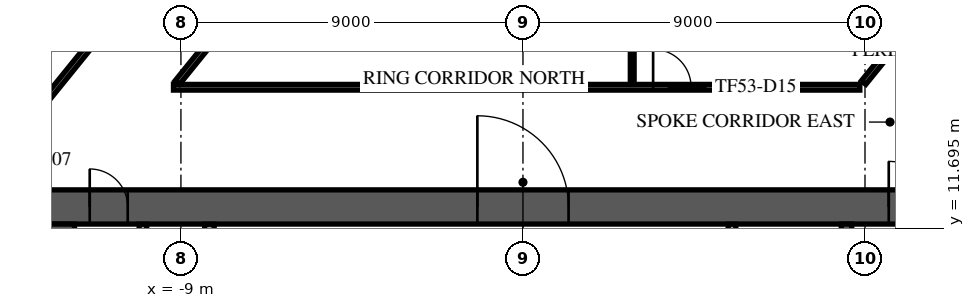
"""IFC4 building model, lengths in metres.
Left out: names, types, materials, properties, quantities, classifications, styles, units other than length and angle.
Written with IfcOpenShell. Run it as: python <this file> out.ifc"""

import sys

from ifc_helpers import new_model, si_unit, direction, frame, frame_2d, origin, place, context, subcontext, project, spatial, rectangle, extrude, element, fill, save


model = new_model("IFC4")
c1 = context("Model", 3, precision=1e-05, world=origin(), true_north=direction((0.0, 1.0)))
c2 = subcontext(c1, "Body", "Model", "MODEL_VIEW")
j1 = project(units=[si_unit("LENGTHUNIT", "METRE"), si_unit("PLANEANGLEUNIT", "RADIAN")], contexts=[c1])
p1 = place(None, origin())
s1 = spatial("IfcSite", under=j1, at=p1, CompositionType="ELEMENT")
p2 = place(p1, origin())
s2 = spatial("IfcBuilding", under=s1, at=p2, CompositionType="ELEMENT")
p3 = place(p2, frame((0.0, 0.0, 225.3)))
s3 = spatial("IfcBuildingStorey", under=s2, at=p3, CompositionType="ELEMENT", Elevation=225.3)
p4 = place(p3, frame((-12.7, 12.25, 0.0), z_axis=(0.0, 0.0, 1.0), x_axis=(1.0, 0.0, 0.0)))
e1 = element("IfcWall", 1, at=p4, inside=s3, PredefinedType="SHEAR", context=c2, shape_type="SweptSolid", body=[
    extrude(rectangle(XDim=25.4, YDim=0.9, at=frame_2d((12.7, 0.0))), origin(), (0.0, 0.0, 1.0), 3.62),
])
p5 = place(p4, frame((11.5, 0.0, 0.0)))
e2 = element("IfcOpeningElement", 2, at=p5, cuts=e1, PredefinedType="OPENING", context=c2, shape_type="SweptSolid", body=[
    extrude(rectangle(XDim=2.4, YDim=2.4, at=frame_2d((1.2, 1.2))), frame((0.0, 0.46, 0.0), z_axis=(0.0, -1.0, 0.0), x_axis=(1.0, 0.0, 0.0)), (0.0, 0.0, 1.0), 0.92),
])
p6 = place(p4, frame((22.325, 0.0, 0.0)))
e3 = element("IfcOpeningElement", 3, at=p6, cuts=e1, PredefinedType="OPENING", context=c2, shape_type="SweptSolid", body=[
    extrude(rectangle(XDim=1.2, YDim=2.1, at=frame_2d((0.6, 1.05))), frame((0.0, 0.46, 0.0), z_axis=(0.0, -1.0, 0.0), x_axis=(1.0, 0.0, 0.0)), (0.0, 0.0, 1.0), 0.92),
])
p7 = place(p4, frame((1.3, 0.0, 0.0)))
e4 = element("IfcOpeningElement", 4, at=p7, cuts=e1, PredefinedType="OPENING", context=c2, shape_type="SweptSolid", body=[
    extrude(rectangle(XDim=1.0, YDim=2.1, at=frame_2d((0.5, 1.05))), frame((0.0, 0.46, 0.0), z_axis=(0.0, -1.0, 0.0), x_axis=(1.0, 0.0, 0.0)), (0.0, 0.0, 1.0), 0.92),
])
p8 = place(p3, frame((-12.25, -11.8, 0.0), z_axis=(0.0, 0.0, 1.0), x_axis=(0.0, 1.0, 0.0)))
e5 = element("IfcWall", 5, at=p8, inside=s3, PredefinedType="SHEAR", context=c2, shape_type="SweptSolid", body=[
    extrude(rectangle(XDim=23.6, YDim=0.9, at=frame_2d((11.8, 0.0))), origin(), (0.0, 0.0, 1.0), 3.62),
])
p9 = place(p8, frame((10.6, 0.0, 0.0)))
e6 = element("IfcOpeningElement", 6, at=p9, cuts=e5, PredefinedType="OPENING", context=c2, shape_type="SweptSolid", body=[
    extrude(rectangle(XDim=2.4, YDim=2.4, at=frame_2d((1.2, 1.2))), frame((0.0, 0.46, 0.0), z_axis=(0.0, -1.0, 0.0), x_axis=(1.0, 0.0, 0.0)), (0.0, 0.0, 1.0), 0.92),
])
p10 = place(p3, frame((8.512, 4.55, 0.0), z_axis=(0.0, 0.0, 1.0), x_axis=(0.0, 1.0, 0.0)))
e7 = element("IfcWall", 7, at=p10, inside=s3, PredefinedType="SOLIDWALL", context=c2, shape_type="SweptSolid", body=[
    extrude(rectangle(XDim=7.25, YDim=0.275, at=frame_2d((3.625, 0.0))), origin(), (0.0, 0.0, 1.0), 3.62),
])
p11 = place(p10, frame((6.0, 0.0, 0.0)))
e8 = element("IfcOpeningElement", 8, at=p11, cuts=e7, PredefinedType="OPENING", context=c2, shape_type="SweptSolid", body=[
    extrude(rectangle(XDim=1.0, YDim=2.1, at=frame_2d((0.5, 1.05))), frame((0.0, 0.147, 0.0), z_axis=(0.0, -1.0, 0.0), x_axis=(1.0, 0.0, 0.0)), (0.0, 0.0, 1.0), 0.295),
])
p12 = place(p3, frame((-10.0, 4.78, 0.0), z_axis=(0.0, 0.0, 1.0), x_axis=(0.0, 1.0, 0.0)))
e9 = element("IfcWall", 9, at=p12, inside=s3, PredefinedType="PARTITIONING", context=c2, shape_type="SweptSolid", body=[
    extrude(rectangle(XDim=7.015, YDim=0.2, at=frame_2d((3.507, 0.0))), origin(), (0.0, 0.0, 1.0), 3.62),
])
p13 = place(p12, frame((2.92, 0.0, 0.0)))
e10 = element("IfcOpeningElement", 10, at=p13, cuts=e9, PredefinedType="OPENING", context=c2, shape_type="SweptSolid", body=[
    extrude(rectangle(XDim=1.0, YDim=2.1, at=frame_2d((0.5, 1.05))), frame((0.0, 0.11, 0.0), z_axis=(0.0, -1.0, 0.0), x_axis=(1.0, 0.0, 0.0)), (0.0, 0.0, 1.0), 0.22),
])
p14 = place(p3, frame((-8.25, 8.805, 0.0), z_axis=(0.0, 0.0, 1.0), x_axis=(0.0, 1.0, 0.0)))
e11 = element("IfcWall", 11, at=p14, inside=s3, PredefinedType="PARTITIONING", context=c2, shape_type="SweptSolid", body=[
    extrude(rectangle(XDim=2.99, YDim=0.25, at=frame_2d((1.495, 0.0))), origin(), (0.0, 0.0, 1.0), 3.62),
])
p15 = place(p14, frame((0.895, 0.0, 0.0)))
e12 = element("IfcOpeningElement", 12, at=p15, cuts=e11, PredefinedType="OPENING", context=c2, shape_type="SweptSolid", body=[
    extrude(rectangle(XDim=1.0, YDim=2.1, at=frame_2d((0.5, 1.05))), frame((0.0, 0.135, 0.0), z_axis=(0.0, -1.0, 0.0), x_axis=(1.0, 0.0, 0.0)), (0.0, 0.0, 1.0), 0.27),
])
p16 = place(p3, frame((5.5, 8.805, 0.0), z_axis=(0.0, 0.0, 1.0), x_axis=(0.0, 1.0, 0.0)))
e13 = element("IfcWall", 13, at=p16, inside=s3, PredefinedType="PARTITIONING", context=c2, shape_type="SweptSolid", body=[
    extrude(rectangle(XDim=2.99, YDim=0.2, at=frame_2d((1.495, 0.0))), origin(), (0.0, 0.0, 1.0), 3.62),
])
p17 = place(p16, frame((0.532, 0.0, 0.0)))
e14 = element("IfcOpeningElement", 14, at=p17, cuts=e13, PredefinedType="OPENING", context=c2, shape_type="SweptSolid", body=[
    extrude(rectangle(XDim=1.8, YDim=2.1, at=frame_2d((0.9, 1.05))), frame((0.0, 0.11, 0.0), z_axis=(0.0, -1.0, 0.0), x_axis=(1.0, 0.0, 0.0)), (0.0, 0.0, 1.0), 0.22),
])
p18 = place(p3, frame((-3.777, 34.584, 0.0), z_axis=(0.0, 0.0, 1.0), x_axis=(-0.629323778295, -0.777143218508, 0.0)))
e15 = element("IfcWall", 15, at=p18, inside=s3, PredefinedType="STANDARD", context=c2, shape_type="SweptSolid", body=[
    extrude(rectangle(XDim=49.0, YDim=0.6, at=frame_2d((24.5, 0.0))), origin(), (0.0, 0.0, 1.0), 3.62),
])
p19 = place(p18, frame((1.227, 0.0, 0.9)))
e16 = element("IfcOpeningElement", 16, at=p19, cuts=e15, PredefinedType="OPENING", context=c2, shape_type="SweptSolid", body=[
    extrude(rectangle(XDim=2.0, YDim=2.1, at=frame_2d((1.0, 1.05))), frame((0.0, 0.31, 0.0), z_axis=(0.0, -1.0, 0.0), x_axis=(1.0, 0.0, 0.0)), (0.0, 0.0, 1.0), 0.62),
])
p20 = place(p18, frame((5.682, 0.0, 0.9)))
e17 = element("IfcOpeningElement", 17, at=p20, cuts=e15, PredefinedType="OPENING", context=c2, shape_type="SweptSolid", body=[
    extrude(rectangle(XDim=2.0, YDim=2.1, at=frame_2d((1.0, 1.05))), frame((0.0, 0.31, 0.0), z_axis=(0.0, -1.0, 0.0), x_axis=(1.0, 0.0, 0.0)), (0.0, 0.0, 1.0), 0.62),
])
p21 = place(p18, frame((10.136, 0.0, 0.9)))
e18 = element("IfcOpeningElement", 18, at=p21, cuts=e15, PredefinedType="OPENING", context=c2, shape_type="SweptSolid", body=[
    extrude(rectangle(XDim=2.0, YDim=2.1, at=frame_2d((1.0, 1.05))), frame((0.0, 0.31, 0.0), z_axis=(0.0, -1.0, 0.0), x_axis=(1.0, 0.0, 0.0)), (0.0, 0.0, 1.0), 0.62),
])
p22 = place(p18, frame((14.591, 0.0, 0.9)))
e19 = element("IfcOpeningElement", 19, at=p22, cuts=e15, PredefinedType="OPENING", context=c2, shape_type="SweptSolid", body=[
    extrude(rectangle(XDim=2.0, YDim=2.1, at=frame_2d((1.0, 1.05))), frame((0.0, 0.31, 0.0), z_axis=(0.0, -1.0, 0.0), x_axis=(1.0, 0.0, 0.0)), (0.0, 0.0, 1.0), 0.62),
])
p23 = place(p18, frame((19.045, 0.0, 0.9)))
e20 = element("IfcOpeningElement", 20, at=p23, cuts=e15, PredefinedType="OPENING", context=c2, shape_type="SweptSolid", body=[
    extrude(rectangle(XDim=2.0, YDim=2.1, at=frame_2d((1.0, 1.05))), frame((0.0, 0.31, 0.0), z_axis=(0.0, -1.0, 0.0), x_axis=(1.0, 0.0, 0.0)), (0.0, 0.0, 1.0), 0.62),
])
p24 = place(p18, frame((23.5, 0.0, 0.9)))
e21 = element("IfcOpeningElement", 21, at=p24, cuts=e15, PredefinedType="OPENING", context=c2, shape_type="SweptSolid", body=[
    extrude(rectangle(XDim=2.0, YDim=2.1, at=frame_2d((1.0, 1.05))), frame((0.0, 0.31, 0.0), z_axis=(0.0, -1.0, 0.0), x_axis=(1.0, 0.0, 0.0)), (0.0, 0.0, 1.0), 0.62),
])
p25 = place(p18, frame((27.955, 0.0, 0.9)))
e22 = element("IfcOpeningElement", 22, at=p25, cuts=e15, PredefinedType="OPENING", context=c2, shape_type="SweptSolid", body=[
    extrude(rectangle(XDim=2.0, YDim=2.1, at=frame_2d((1.0, 1.05))), frame((0.0, 0.31, 0.0), z_axis=(0.0, -1.0, 0.0), x_axis=(1.0, 0.0, 0.0)), (0.0, 0.0, 1.0), 0.62),
])
p26 = place(p18, frame((32.409, 0.0, 0.9)))
e23 = element("IfcOpeningElement", 23, at=p26, cuts=e15, PredefinedType="OPENING", context=c2, shape_type="SweptSolid", body=[
    extrude(rectangle(XDim=2.0, YDim=2.1, at=frame_2d((1.0, 1.05))), frame((0.0, 0.31, 0.0), z_axis=(0.0, -1.0, 0.0), x_axis=(1.0, 0.0, 0.0)), (0.0, 0.0, 1.0), 0.62),
])
p27 = place(p18, frame((36.864, 0.0, 0.9)))
e24 = element("IfcOpeningElement", 24, at=p27, cuts=e15, PredefinedType="OPENING", context=c2, shape_type="SweptSolid", body=[
    extrude(rectangle(XDim=2.0, YDim=2.1, at=frame_2d((1.0, 1.05))), frame((0.0, 0.31, 0.0), z_axis=(0.0, -1.0, 0.0), x_axis=(1.0, 0.0, 0.0)), (0.0, 0.0, 1.0), 0.62),
])
p28 = place(p18, frame((41.318, 0.0, 0.9)))
e25 = element("IfcOpeningElement", 25, at=p28, cuts=e15, PredefinedType="OPENING", context=c2, shape_type="SweptSolid", body=[
    extrude(rectangle(XDim=2.0, YDim=2.1, at=frame_2d((1.0, 1.05))), frame((0.0, 0.31, 0.0), z_axis=(0.0, -1.0, 0.0), x_axis=(1.0, 0.0, 0.0)), (0.0, 0.0, 1.0), 0.62),
])
p29 = place(p18, frame((45.773, 0.0, 0.9)))
e26 = element("IfcOpeningElement", 26, at=p29, cuts=e15, PredefinedType="OPENING", context=c2, shape_type="SweptSolid", body=[
    extrude(rectangle(XDim=2.0, YDim=2.1, at=frame_2d((1.0, 1.05))), frame((0.0, 0.31, 0.0), z_axis=(0.0, -1.0, 0.0), x_axis=(1.0, 0.0, 0.0)), (0.0, 0.0, 1.0), 0.62),
])
p30 = place(p3, frame((33.845, 10.81, 0.0), z_axis=(0.0, 0.0, 1.0), x_axis=(-0.777145437972, 0.629321037499, 0.0)))
e27 = element("IfcWall", 27, at=p30, inside=s3, PredefinedType="STANDARD", context=c2, shape_type="SweptSolid", body=[
    extrude(rectangle(XDim=39.0, YDim=0.6, at=frame_2d((19.5, 0.0))), origin(), (0.0, 0.0, 1.0), 3.62),
])
p31 = place(p30, frame((1.217, 0.0, 0.9)))
e28 = element("IfcOpeningElement", 28, at=p31, cuts=e27, PredefinedType="OPENING", context=c2, shape_type="SweptSolid", body=[
    extrude(rectangle(XDim=1.9, YDim=2.1, at=frame_2d((0.95, 1.05))), frame((0.0, 0.31, 0.0), z_axis=(0.0, -1.0, 0.0), x_axis=(1.0, 0.0, 0.0)), (0.0, 0.0, 1.0), 0.62),
])
p32 = place(p30, frame((5.55, 0.0, 0.9)))
e29 = element("IfcOpeningElement", 29, at=p32, cuts=e27, PredefinedType="OPENING", context=c2, shape_type="SweptSolid", body=[
    extrude(rectangle(XDim=1.9, YDim=2.1, at=frame_2d((0.95, 1.05))), frame((0.0, 0.31, 0.0), z_axis=(0.0, -1.0, 0.0), x_axis=(1.0, 0.0, 0.0)), (0.0, 0.0, 1.0), 0.62),
])
p33 = place(p30, frame((9.883, 0.0, 0.9)))
e30 = element("IfcOpeningElement", 30, at=p33, cuts=e27, PredefinedType="OPENING", context=c2, shape_type="SweptSolid", body=[
    extrude(rectangle(XDim=1.9, YDim=2.1, at=frame_2d((0.95, 1.05))), frame((0.0, 0.31, 0.0), z_axis=(0.0, -1.0, 0.0), x_axis=(1.0, 0.0, 0.0)), (0.0, 0.0, 1.0), 0.62),
])
p34 = place(p30, frame((14.217, 0.0, 0.9)))
e31 = element("IfcOpeningElement", 31, at=p34, cuts=e27, PredefinedType="OPENING", context=c2, shape_type="SweptSolid", body=[
    extrude(rectangle(XDim=1.9, YDim=2.1, at=frame_2d((0.95, 1.05))), frame((0.0, 0.31, 0.0), z_axis=(0.0, -1.0, 0.0), x_axis=(1.0, 0.0, 0.0)), (0.0, 0.0, 1.0), 0.62),
])
p35 = place(p30, frame((18.55, 0.0, 0.9)))
e32 = element("IfcOpeningElement", 32, at=p35, cuts=e27, PredefinedType="OPENING", context=c2, shape_type="SweptSolid", body=[
    extrude(rectangle(XDim=1.9, YDim=2.1, at=frame_2d((0.95, 1.05))), frame((0.0, 0.31, 0.0), z_axis=(0.0, -1.0, 0.0), x_axis=(1.0, 0.0, 0.0)), (0.0, 0.0, 1.0), 0.62),
])
p36 = place(p30, frame((22.883, 0.0, 0.9)))
e33 = element("IfcOpeningElement", 33, at=p36, cuts=e27, PredefinedType="OPENING", context=c2, shape_type="SweptSolid", body=[
    extrude(rectangle(XDim=1.9, YDim=2.1, at=frame_2d((0.95, 1.05))), frame((0.0, 0.31, 0.0), z_axis=(0.0, -1.0, 0.0), x_axis=(1.0, 0.0, 0.0)), (0.0, 0.0, 1.0), 0.62),
])
p37 = place(p30, frame((27.217, 0.0, 0.9)))
e34 = element("IfcOpeningElement", 34, at=p37, cuts=e27, PredefinedType="OPENING", context=c2, shape_type="SweptSolid", body=[
    extrude(rectangle(XDim=1.9, YDim=2.1, at=frame_2d((0.95, 1.05))), frame((0.0, 0.31, 0.0), z_axis=(0.0, -1.0, 0.0), x_axis=(1.0, 0.0, 0.0)), (0.0, 0.0, 1.0), 0.62),
])
p38 = place(p30, frame((31.55, 0.0, 0.9)))
e35 = element("IfcOpeningElement", 35, at=p38, cuts=e27, PredefinedType="OPENING", context=c2, shape_type="SweptSolid", body=[
    extrude(rectangle(XDim=1.9, YDim=2.1, at=frame_2d((0.95, 1.05))), frame((0.0, 0.31, 0.0), z_axis=(0.0, -1.0, 0.0), x_axis=(1.0, 0.0, 0.0)), (0.0, 0.0, 1.0), 0.62),
])
p39 = place(p30, frame((35.883, 0.0, 0.9)))
e36 = element("IfcOpeningElement", 36, at=p39, cuts=e27, PredefinedType="OPENING", context=c2, shape_type="SweptSolid", body=[
    extrude(rectangle(XDim=1.9, YDim=2.1, at=frame_2d((0.95, 1.05))), frame((0.0, 0.31, 0.0), z_axis=(0.0, -1.0, 0.0), x_axis=(1.0, 0.0, 0.0)), (0.0, 0.0, 1.0), 0.62),
])
p40 = place(p3, frame((-26.769, -2.487, 0.0), z_axis=(0.0, 0.0, 1.0), x_axis=(0.629320703929, 0.777145708092, 0.0)))
e37 = element("IfcWall", 37, at=p40, inside=s3, PredefinedType="PARTITIONING", context=c2, shape_type="SweptSolid", body=[
    extrude(rectangle(XDim=37.558, YDim=0.15, at=frame_2d((18.779, 0.0))), origin(), (0.0, 0.0, 1.0), 2.97),
])
p41 = place(p40, frame((3.55, 0.0, 0.0)))
e38 = element("IfcOpeningElement", 38, at=p41, cuts=e37, PredefinedType="OPENING", context=c2, shape_type="SweptSolid", body=[
    extrude(rectangle(XDim=1.0, YDim=2.1, at=frame_2d((0.5, 1.05))), frame((0.0, 0.085, 0.0), z_axis=(0.0, -1.0, 0.0), x_axis=(1.0, 0.0, 0.0)), (0.0, 0.0, 1.0), 0.17),
])
p42 = place(p40, frame((11.862, 0.0, 0.0)))
e39 = element("IfcOpeningElement", 39, at=p42, cuts=e37, PredefinedType="OPENING", context=c2, shape_type="SweptSolid", body=[
    extrude(rectangle(XDim=1.0, YDim=2.1, at=frame_2d((0.5, 1.05))), frame((0.0, 0.085, 0.0), z_axis=(0.0, -1.0, 0.0), x_axis=(1.0, 0.0, 0.0)), (0.0, 0.0, 1.0), 0.17),
])
p43 = place(p40, frame((21.452, 0.0, 0.0)))
e40 = element("IfcOpeningElement", 40, at=p43, cuts=e37, PredefinedType="OPENING", context=c2, shape_type="SweptSolid", body=[
    extrude(rectangle(XDim=1.0, YDim=2.1, at=frame_2d((0.5, 1.05))), frame((0.0, 0.085, 0.0), z_axis=(0.0, -1.0, 0.0), x_axis=(1.0, 0.0, 0.0)), (0.0, 0.0, 1.0), 0.17),
])
p44 = place(p40, frame((31.223, 0.0, 0.0)))
e41 = element("IfcOpeningElement", 41, at=p44, cuts=e37, PredefinedType="OPENING", context=c2, shape_type="SweptSolid", body=[
    extrude(rectangle(XDim=1.0, YDim=2.1, at=frame_2d((0.5, 1.05))), frame((0.0, 0.085, 0.0), z_axis=(0.0, -1.0, 0.0), x_axis=(1.0, 0.0, 0.0)), (0.0, 0.0, 1.0), 0.17),
])
p45 = place(p40, frame((35.359, 0.0, 0.0)))
e42 = element("IfcOpeningElement", 42, at=p45, cuts=e37, PredefinedType="OPENING", context=c2, shape_type="SweptSolid", body=[
    extrude(rectangle(XDim=1.0, YDim=2.1, at=frame_2d((0.5, 1.05))), frame((0.0, 0.085, 0.0), z_axis=(0.0, -1.0, 0.0), x_axis=(1.0, 0.0, 0.0)), (0.0, 0.0, 1.0), 0.17),
])
p46 = place(p3, frame((-9.196, 15.4, 0.0), z_axis=(0.0, 0.0, 1.0), x_axis=(1.0, 0.0, 0.0)))
e43 = element("IfcWall", 43, at=p46, inside=s3, PredefinedType="PARTITIONING", context=c2, shape_type="SweptSolid", body=[
    extrude(rectangle(XDim=18.06, YDim=0.15, at=frame_2d((9.03, 0.0))), origin(), (0.0, 0.0, 1.0), 3.17),
])
p47 = place(p46, frame((12.621, 0.0, 0.0)))
e44 = element("IfcOpeningElement", 44, at=p47, cuts=e43, PredefinedType="OPENING", context=c2, shape_type="SweptSolid", body=[
    extrude(rectangle(XDim=1.0, YDim=2.1, at=frame_2d((0.5, 1.05))), frame((0.0, 0.085, 0.0), z_axis=(0.0, -1.0, 0.0), x_axis=(1.0, 0.0, 0.0)), (0.0, 0.0, 1.0), 0.17),
])
p48 = place(p3, frame((-9.097, 15.522, 0.0), z_axis=(0.0, 0.0, 1.0), x_axis=(0.629294773149, 0.777166705725, 0.0)))
e45 = element("IfcWall", 45, at=p48, inside=s3, PredefinedType="PARTITIONING", context=c2, shape_type="SweptSolid", body=[
    extrude(rectangle(XDim=12.366, YDim=0.15, at=frame_2d((6.183, 0.0))), origin(), (0.0, 0.0, 1.0), 3.17),
])
p49 = place(p48, frame((3.05, 0.0, 0.0)))
e46 = element("IfcOpeningElement", 46, at=p49, cuts=e45, PredefinedType="OPENING", context=c2, shape_type="SweptSolid", body=[
    extrude(rectangle(XDim=1.8, YDim=2.1, at=frame_2d((0.9, 1.05))), frame((0.0, 0.085, 0.0), z_axis=(0.0, -1.0, 0.0), x_axis=(1.0, 0.0, 0.0)), (0.0, 0.0, 1.0), 0.17),
])
p50 = place(p3, frame((3.616, 25.688, 0.0), z_axis=(0.0, 0.0, 1.0), x_axis=(0.777137029952, -0.62933142038, 0.0)))
e47 = element("IfcWall", 47, at=p50, inside=s3, PredefinedType="PARTITIONING", context=c2, shape_type="SweptSolid", body=[
    extrude(rectangle(XDim=26.785, YDim=0.15, at=frame_2d((13.393, 0.0))), origin(), (0.0, 0.0, 1.0), 3.17),
])
p51 = place(p50, frame((12.682, 0.0, 0.0)))
e48 = element("IfcOpeningElement", 48, at=p51, cuts=e47, PredefinedType="OPENING", context=c2, shape_type="SweptSolid", body=[
    extrude(rectangle(XDim=1.0, YDim=2.1, at=frame_2d((0.5, 1.05))), frame((0.0, 0.085, 0.0), z_axis=(0.0, -1.0, 0.0), x_axis=(1.0, 0.0, 0.0)), (0.0, 0.0, 1.0), 0.17),
])
p52 = place(p50, frame((16.597, 0.0, 0.0)))
e49 = element("IfcOpeningElement", 49, at=p52, cuts=e47, PredefinedType="OPENING", context=c2, shape_type="SweptSolid", body=[
    extrude(rectangle(XDim=1.0, YDim=2.1, at=frame_2d((0.5, 1.05))), frame((0.0, 0.085, 0.0), z_axis=(0.0, -1.0, 0.0), x_axis=(1.0, 0.0, 0.0)), (0.0, 0.0, 1.0), 0.17),
])
p53 = place(p3, frame((8.963, 15.522, 0.0), z_axis=(0.0, 0.0, 1.0), x_axis=(0.629539094885, 0.776968807618, 0.0)))
e50 = element("IfcWall", 50, at=p53, inside=s3, PredefinedType="PARTITIONING", context=c2, shape_type="SweptSolid", body=[
    extrude(rectangle(XDim=2.06, YDim=0.15, at=frame_2d((1.03, 0.0))), origin(), (0.0, 0.0, 1.0), 3.17),
])
p54 = place(p3, frame((2.875, 15.475, 0.0), z_axis=(0.0, 0.0, 1.0), x_axis=(0.0, 1.0, 0.0)))
e51 = element("IfcWall", 51, at=p54, inside=s3, PredefinedType="PARTITIONING", context=c2, shape_type="SweptSolid", body=[
    extrude(rectangle(XDim=3.949, YDim=0.1, at=frame_2d((1.975, 0.0))), origin(), (0.0, 0.0, 1.0), 3.62),
])
p55 = place(p5, origin())
e52 = element("IfcDoor", 52, at=p55, inside=s3, OperationType="SINGLE_SWING_LEFT", PredefinedType="DOOR", context=c2, shape_type="SweptSolid", body=[
    extrude(rectangle(XDim=2.4, YDim=2.4, at=frame_2d((1.2, 1.2))), frame((0.0, 0.025, 0.0), z_axis=(0.0, -1.0, 0.0), x_axis=(1.0, 0.0, 0.0)), (0.0, 0.0, 1.0), 0.05),
])
fill(e2, e52)
p56 = place(p6, origin())
e53 = element("IfcDoor", 53, at=p56, inside=s3, OperationType="SINGLE_SWING_LEFT", PredefinedType="DOOR", context=c2, shape_type="SweptSolid", body=[
    extrude(rectangle(XDim=1.2, YDim=2.1, at=frame_2d((0.6, 1.05))), frame((0.0, 0.025, 0.0), z_axis=(0.0, -1.0, 0.0), x_axis=(1.0, 0.0, 0.0)), (0.0, 0.0, 1.0), 0.05),
])
fill(e3, e53)
p57 = place(p7, origin())
e54 = element("IfcDoor", 54, at=p57, inside=s3, OperationType="SINGLE_SWING_LEFT", PredefinedType="DOOR", context=c2, shape_type="SweptSolid", body=[
    extrude(rectangle(XDim=1.0, YDim=2.1, at=frame_2d((0.5, 1.05))), frame((0.0, 0.025, 0.0), z_axis=(0.0, -1.0, 0.0), x_axis=(1.0, 0.0, 0.0)), (0.0, 0.0, 1.0), 0.05),
])
fill(e4, e54)
p58 = place(p47, origin())
e55 = element("IfcDoor", 55, at=p58, inside=s3, OperationType="SINGLE_SWING_LEFT", PredefinedType="DOOR", context=c2, shape_type="SweptSolid", body=[
    extrude(rectangle(XDim=1.0, YDim=2.1, at=frame_2d((0.5, 1.05))), frame((0.0, 0.025, 0.0), z_axis=(0.0, -1.0, 0.0), x_axis=(1.0, 0.0, 0.0)), (0.0, 0.0, 1.0), 0.05),
])
fill(e44, e55)
save(model, sys.argv[1])
